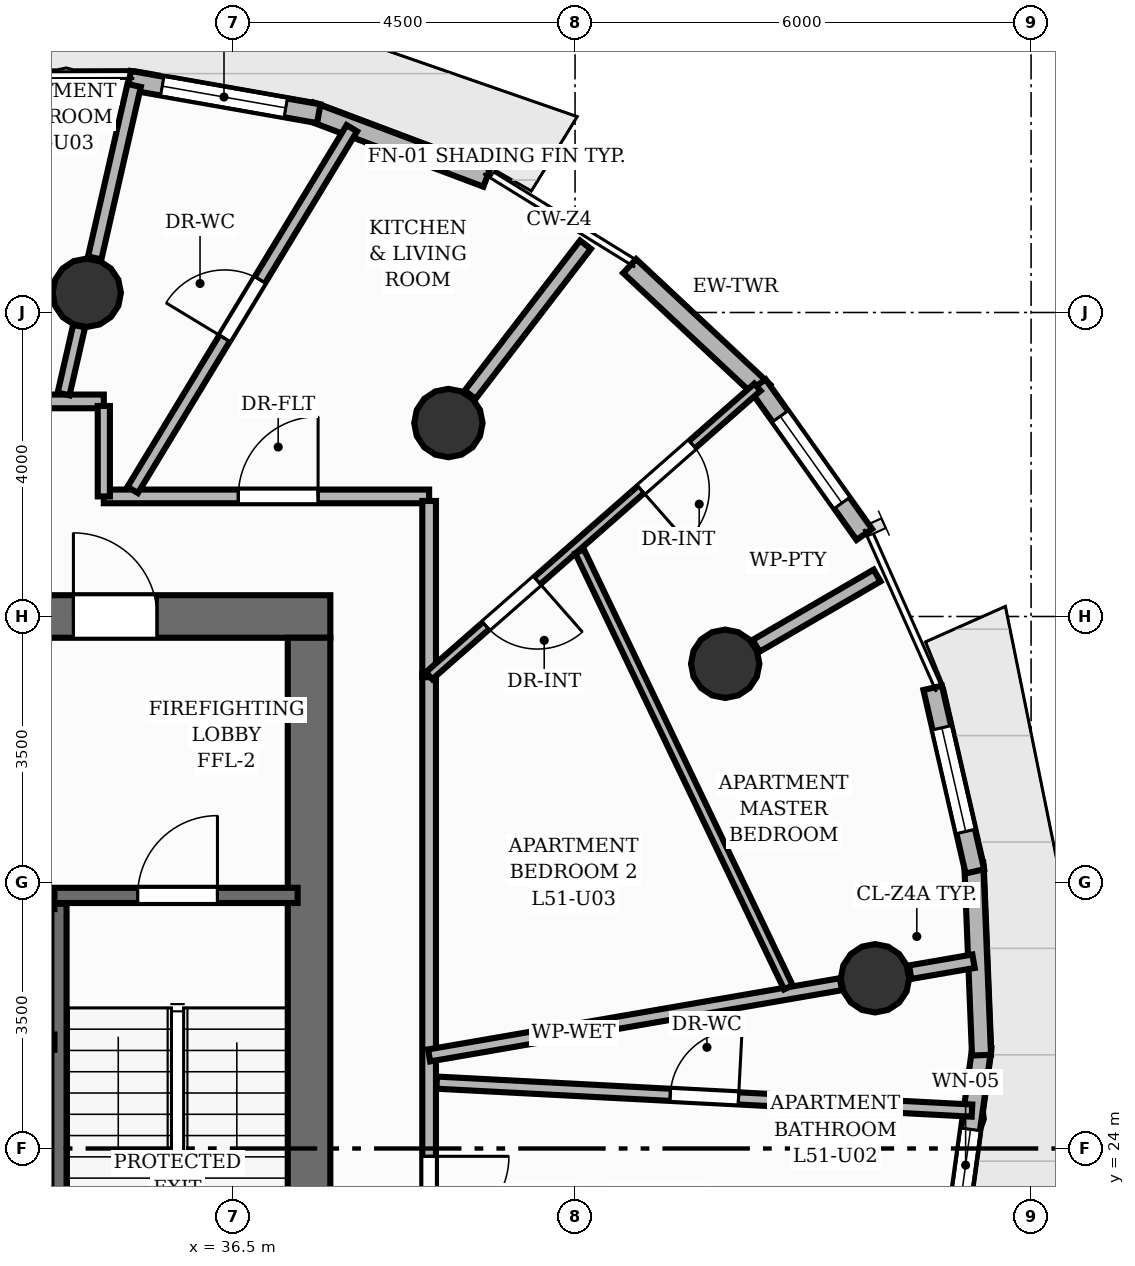
"""IFC4 building model, lengths in metres.
Left out: names, types, materials, properties, quantities, classifications, styles, units other than length and angle.
Written with IfcOpenShell. Run it as: python <this file> out.ifc"""

import sys

from ifc_helpers import new_model, si_unit, direction, frame, frame_2d, origin, origin_2d, place, context, subcontext, project, spatial, rectangle, circle, extrude, element, fill, save


model = new_model("IFC4")
c1 = context("Model", 3, precision=1e-05, world=origin(), true_north=direction((0.0, 1.0)))
c2 = subcontext(c1, "Body", "Model", "MODEL_VIEW")
j1 = project(units=[si_unit("LENGTHUNIT", "METRE"), si_unit("PLANEANGLEUNIT", "RADIAN")], contexts=[c1])
p1 = place(None, origin())
s1 = spatial("IfcSite", under=j1, at=p1, CompositionType="ELEMENT")
p2 = place(p1, origin())
s2 = spatial("IfcBuilding", under=s1, at=p2, CompositionType="ELEMENT")
p3 = place(p2, frame((0.0, 0.0, 172.64)))
s3 = spatial("IfcBuildingStorey", under=s2, at=p3, CompositionType="ELEMENT", Elevation=172.64)
p4 = place(p3, frame((26.22, 31.0, 0.0), z_axis=(0.0, 0.0, 1.0), x_axis=(1.0, 0.0, 0.0)))
e1 = element("IfcWall", 1, at=p4, inside=s3, PredefinedType="SHEAR", context=c2, shape_type="SweptSolid", body=[
    extrude(rectangle(XDim=11.56, YDim=0.56, at=frame_2d((5.78, 0.0))), origin(), (0.0, 0.0, 1.0), 3.2),
])
p5 = place(p4, frame((8.18, 0.0, 0.0)))
e2 = element("IfcOpeningElement", 2, at=p5, cuts=e1, PredefinedType="OPENING", context=c2, shape_type="SweptSolid", body=[
    extrude(rectangle(XDim=1.1, YDim=2.15, at=frame_2d((0.55, 1.075))), frame((0.0, 0.29, 0.0), z_axis=(0.0, -1.0, 0.0), x_axis=(1.0, 0.0, 0.0)), (0.0, 0.0, 1.0), 0.58),
])
p6 = place(p4, frame((0.805, 0.0, 0.0)))
e3 = element("IfcOpeningElement", 3, at=p6, cuts=e1, PredefinedType="OPENING", context=c2, shape_type="SweptSolid", body=[
    extrude(rectangle(XDim=1.05, YDim=2.15, at=frame_2d((0.525, 1.075))), frame((0.0, 0.29, 0.0), z_axis=(0.0, -1.0, 0.0), x_axis=(1.0, 0.0, 0.0)), (0.0, 0.0, 1.0), 0.58),
])
p7 = place(p4, frame((2.555, 0.0, 0.0)))
e4 = element("IfcOpeningElement", 4, at=p7, cuts=e1, PredefinedType="OPENING", context=c2, shape_type="SweptSolid", body=[
    extrude(rectangle(XDim=1.05, YDim=2.15, at=frame_2d((0.525, 1.075))), frame((0.0, 0.29, 0.0), z_axis=(0.0, -1.0, 0.0), x_axis=(1.0, 0.0, 0.0)), (0.0, 0.0, 1.0), 0.58),
])
p8 = place(p4, frame((4.305, 0.0, 0.0)))
e5 = element("IfcOpeningElement", 5, at=p8, cuts=e1, PredefinedType="OPENING", context=c2, shape_type="SweptSolid", body=[
    extrude(rectangle(XDim=1.05, YDim=2.15, at=frame_2d((0.525, 1.075))), frame((0.0, 0.29, 0.0), z_axis=(0.0, -1.0, 0.0), x_axis=(1.0, 0.0, 0.0)), (0.0, 0.0, 1.0), 0.58),
])
p9 = place(p3, frame((37.5, 17.28, 0.0), z_axis=(0.0, 0.0, 1.0), x_axis=(0.0, 1.0, 0.0)))
e6 = element("IfcWall", 6, at=p9, inside=s3, PredefinedType="SHEAR", context=c2, shape_type="SweptSolid", body=[
    extrude(rectangle(XDim=13.44, YDim=0.56, at=frame_2d((6.72, 0.0))), origin(), (0.0, 0.0, 1.0), 3.2),
])
for number, where, z_axis, x_axis in (
    (7, (44.946, 26.24, 0.0), (0.0, 0.0, 1.0), (1.0, 0.0, 0.0)),
    (8, (42.975, 30.378, 0.0), (0.0, 0.0, 1.0), (1.0, 0.0, 0.0)),
    (9, (39.333, 33.545, 0.0), (0.0, 0.0, 1.0), (1.0, 0.0, 0.0)),
    (10, (34.575, 35.26, 0.0), (0.0, 0.0, 1.0), (1.0, 0.0, 0.0)),
):
    element("IfcColumn", number, at=place(p3, frame(where, z_axis=z_axis, x_axis=x_axis)), inside=s3, PredefinedType="COLUMN", context=c2, shape_type="SweptSolid", body=[
        extrude(circle(Radius=0.45, at=origin_2d()), origin(), (0.0, 0.0, 1.0), 3.2),
    ])
p10 = place(p3, frame((41.718, 35.611, 0.0), z_axis=(0.0, 0.0, 1.0), x_axis=(0.730224222865, -0.683207570465, 0.0)))
e11 = element("IfcWall", 11, at=p10, inside=s3, PredefinedType="SOLIDWALL", context=c2, shape_type="SweptSolid", body=[
    extrude(rectangle(XDim=2.415, YDim=0.25, at=frame_2d((1.207, 0.0))), origin(), (0.0, 0.0, 1.0), 2.96),
])
p11 = place(p3, frame((37.519, 37.645, 0.0), z_axis=(0.0, 0.0, 1.0), x_axis=(0.93586674787, -0.352354126172, 0.0)))
e12 = element("IfcWall", 12, at=p11, inside=s3, PredefinedType="SOLIDWALL", context=c2, shape_type="SweptSolid", body=[
    extrude(rectangle(XDim=2.478, YDim=0.25, at=frame_2d((1.239, 0.0))), origin(), (0.0, 0.0, 1.0), 2.96),
])
p12 = place(p3, frame((35.135, 38.055, 0.0), z_axis=(0.0, 0.0, 1.0), x_axis=(0.984837873762, -0.173477267688, 0.0)))
e13 = element("IfcWall", 13, at=p12, inside=s3, PredefinedType="SOLIDWALL", context=c2, shape_type="SweptSolid", body=[
    extrude(rectangle(XDim=2.532, YDim=0.25, at=frame_2d((1.266, 0.0))), origin(), (0.0, 0.0, 1.0), 2.96),
])
p13 = place(p12, frame((0.441, 0.0, 0.85)))
e14 = element("IfcOpeningElement", 14, at=p13, cuts=e13, PredefinedType="OPENING", context=c2, shape_type="SweptSolid", body=[
    extrude(rectangle(XDim=1.65, YDim=1.55, at=frame_2d((0.825, 0.775))), frame((0.0, 0.135, 0.0), z_axis=(0.0, -1.0, 0.0), x_axis=(1.0, 0.0, 0.0)), (0.0, 0.0, 1.0), 0.27),
])
p14 = place(p3, frame((46.353, 25.34, 0.0), z_axis=(0.0, 0.0, 1.0), x_axis=(-0.136289981327, -0.990668986589, 0.0)))
e15 = element("IfcWall", 15, at=p14, inside=s3, PredefinedType="SOLIDWALL", context=c2, shape_type="SweptSolid", body=[
    extrude(rectangle(XDim=2.592, YDim=0.25, at=frame_2d((1.296, 0.0))), origin(), (0.0, 0.0, 1.0), 2.96),
])
p15 = place(p14, frame((1.098, 0.0, 0.85)))
e16 = element("IfcOpeningElement", 16, at=p15, cuts=e15, PredefinedType="OPENING", context=c2, shape_type="SweptSolid", body=[
    extrude(rectangle(XDim=0.95, YDim=1.45, at=frame_2d((0.475, 0.725))), frame((0.0, 0.135, 0.0), z_axis=(0.0, -1.0, 0.0), x_axis=(1.0, 0.0, 0.0)), (0.0, 0.0, 1.0), 0.27),
])
p16 = place(p3, frame((46.245, 27.758, 0.0), z_axis=(0.0, 0.0, 1.0), x_axis=(0.040399298921, -0.999183615081, 0.0)))
e17 = element("IfcWall", 17, at=p16, inside=s3, PredefinedType="SOLIDWALL", context=c2, shape_type="SweptSolid", body=[
    extrude(rectangle(XDim=2.532, YDim=0.25, at=frame_2d((1.266, 0.0))), origin(), (0.0, 0.0, 1.0), 2.96),
])
p17 = place(p3, frame((45.705, 30.061, 0.0), z_axis=(0.0, 0.0, 1.0), x_axis=(0.224175769227, -0.974548728639, 0.0)))
e18 = element("IfcWall", 18, at=p17, inside=s3, PredefinedType="SOLIDWALL", context=c2, shape_type="SweptSolid", body=[
    extrude(rectangle(XDim=2.478, YDim=0.25, at=frame_2d((1.239, 0.0))), origin(), (0.0, 0.0, 1.0), 2.96),
])
p18 = place(p17, frame((0.539, 0.0, 0.85)))
e19 = element("IfcOpeningElement", 19, at=p18, cuts=e18, PredefinedType="OPENING", context=c2, shape_type="SweptSolid", body=[
    extrude(rectangle(XDim=1.4, YDim=1.55, at=frame_2d((0.7, 0.775))), frame((0.0, 0.135, 0.0), z_axis=(0.0, -1.0, 0.0), x_axis=(1.0, 0.0, 0.0)), (0.0, 0.0, 1.0), 0.27),
])
p19 = place(p3, frame((43.406, 34.047, 0.0), z_axis=(0.0, 0.0, 1.0), x_axis=(0.579505880656, -0.814968057217, 0.0)))
e20 = element("IfcWall", 20, at=p19, inside=s3, PredefinedType="SOLIDWALL", context=c2, shape_type="SweptSolid", body=[
    extrude(rectangle(XDim=2.415, YDim=0.25, at=frame_2d((1.208, 0.0))), origin(), (0.0, 0.0, 1.0), 2.96),
])
p20 = place(p19, frame((0.507, 0.0, 0.85)))
e21 = element("IfcOpeningElement", 21, at=p20, cuts=e20, PredefinedType="OPENING", context=c2, shape_type="SweptSolid", body=[
    extrude(rectangle(XDim=1.4, YDim=1.55, at=frame_2d((0.7, 0.775))), frame((0.0, 0.135, 0.0), z_axis=(0.0, -1.0, 0.0), x_axis=(1.0, 0.0, 0.0)), (0.0, 0.0, 1.0), 0.27),
])
p21 = place(p3, frame((34.21, 20.78, 0.0), z_axis=(0.0, 0.0, 1.0), x_axis=(0.0, 1.0, 0.0)))
e22 = element("IfcWall", 22, at=p21, inside=s3, PredefinedType="SHEAR", context=c2, shape_type="SweptSolid", body=[
    extrude(rectangle(XDim=6.44, YDim=0.2, at=frame_2d((3.22, 0.0))), origin(), (0.0, 0.0, 1.0), 3.2),
])
p22 = place(p3, frame((34.11, 27.33, 0.0), z_axis=(0.0, 0.0, 1.0), x_axis=(1.0, 0.0, 0.0)))
e23 = element("IfcWall", 23, at=p22, inside=s3, PredefinedType="SHEAR", context=c2, shape_type="SweptSolid", body=[
    extrude(rectangle(XDim=3.24, YDim=0.2, at=frame_2d((1.62, 0.0))), origin(), (0.0, 0.0, 1.0), 3.2),
])
p23 = place(p22, frame((1.135, 0.0, 0.0)))
e24 = element("IfcOpeningElement", 24, at=p23, cuts=e23, PredefinedType="OPENING", context=c2, shape_type="SweptSolid", body=[
    extrude(rectangle(XDim=1.05, YDim=2.15, at=frame_2d((0.525, 1.075))), frame((0.0, 0.11, 0.0), z_axis=(0.0, -1.0, 0.0), x_axis=(1.0, 0.0, 0.0)), (0.0, 0.0, 1.0), 0.22),
])
p24 = place(p3, frame((31.85, 27.25, 0.0), z_axis=(0.0, 0.0, 1.0), x_axis=(1.0, 0.0, 0.0)))
e25 = element("IfcWall", 25, at=p24, inside=s3, PredefinedType="SHEAR", context=c2, shape_type="SweptSolid", body=[
    extrude(rectangle(XDim=2.3, YDim=0.2, at=frame_2d((1.15, 0.0))), origin(), (0.0, 0.0, 1.0), 3.2),
])
p25 = place(p24, frame((0.95, 0.0, 0.0)))
e26 = element("IfcOpeningElement", 26, at=p25, cuts=e25, PredefinedType="OPENING", context=c2, shape_type="SweptSolid", body=[
    extrude(rectangle(XDim=1.1, YDim=2.15, at=frame_2d((0.55, 1.075))), frame((0.0, 0.11, 0.0), z_axis=(0.0, -1.0, 0.0), x_axis=(1.0, 0.0, 0.0)), (0.0, 0.0, 1.0), 0.22),
])
p26 = place(p3, frame((31.85, 25.4, 0.0), z_axis=(0.0, 0.0, 1.0), x_axis=(1.0, 0.0, 0.0)))
e27 = element("IfcWall", 27, at=p26, inside=s3, PredefinedType="SHEAR", context=c2, shape_type="SweptSolid", body=[
    extrude(rectangle(XDim=2.3, YDim=0.2, at=frame_2d((1.15, 0.0))), origin(), (0.0, 0.0, 1.0), 3.2),
])
p27 = place(p3, frame((45.409, 26.32, 0.0), z_axis=(0.0, 0.0, 1.0), x_axis=(0.985336508055, 0.170622290144, 0.0)))
e28 = element("IfcWall", 28, at=p27, inside=s3, PredefinedType="PARTITIONING", context=c2, shape_type="SweptSolid", body=[
    extrude(rectangle(XDim=0.846, YDim=0.18, at=frame_2d((0.423, 0.0))), origin(), (0.0, 0.0, 1.0), 2.404),
])
p28 = place(p3, frame((43.382, 30.614, 0.0), z_axis=(0.0, 0.0, 1.0), x_axis=(0.864604991586, 0.502452195264, 0.0)))
e29 = element("IfcWall", 29, at=p28, inside=s3, PredefinedType="PARTITIONING", context=c2, shape_type="SweptSolid", body=[
    extrude(rectangle(XDim=1.841, YDim=0.18, at=frame_2d((0.92, 0.0))), origin(), (0.0, 0.0, 1.0), 2.404),
])
p29 = place(p3, frame((39.62, 33.918, 0.0), z_axis=(0.0, 0.0, 1.0), x_axis=(0.609279402228, 0.792955616678, 0.0)))
e30 = element("IfcWall", 30, at=p29, inside=s3, PredefinedType="PARTITIONING", context=c2, shape_type="SweptSolid", body=[
    extrude(rectangle(XDim=2.49, YDim=0.18, at=frame_2d((1.245, 0.0))), origin(), (0.0, 0.0, 1.0), 2.404),
])
p30 = place(p3, frame((34.68, 35.718, 0.0), z_axis=(0.0, 0.0, 1.0), x_axis=(0.222998449778, 0.974818799263, 0.0)))
e31 = element("IfcWall", 31, at=p30, inside=s3, PredefinedType="PARTITIONING", context=c2, shape_type="SweptSolid", body=[
    extrude(rectangle(XDim=2.329, YDim=0.18, at=frame_2d((1.164, 0.0))), origin(), (0.0, 0.0, 1.0), 2.404),
])
p31 = place(p3, frame((39.08, 30.248, 0.0), z_axis=(0.0, 0.0, 1.0), x_axis=(0.0, -1.0, 0.0)))
e32 = element("IfcWall", 32, at=p31, inside=s3, PredefinedType="PARTITIONING", context=c2, shape_type="SweptSolid", body=[
    extrude(rectangle(XDim=14.828, YDim=0.18, at=frame_2d((7.414, 0.0))), origin(), (0.0, 0.0, 1.0), 2.955),
])
p32 = place(p31, frame((6.351, 0.0, 0.0)))
e33 = element("IfcOpeningElement", 33, at=p32, cuts=e32, PredefinedType="OPENING", context=c2, shape_type="SweptSolid", body=[
    extrude(rectangle(XDim=1.05, YDim=2.15, at=frame_2d((0.525, 1.075))), frame((0.0, 0.1, 0.0), z_axis=(0.0, -1.0, 0.0), x_axis=(1.0, 0.0, 0.0)), (0.0, 0.0, 1.0), 0.2),
])
p33 = place(p3, frame((34.8, 32.58, 0.0), z_axis=(0.0, 0.0, 1.0), x_axis=(1.0, 0.0, 0.0)))
e34 = element("IfcWall", 34, at=p33, inside=s3, PredefinedType="PARTITIONING", context=c2, shape_type="SweptSolid", body=[
    extrude(rectangle(XDim=4.28, YDim=0.18, at=frame_2d((2.14, 0.0))), origin(), (0.0, 0.0, 1.0), 2.955),
])
p34 = place(p33, frame((1.769, 0.0, 0.0)))
e35 = element("IfcOpeningElement", 35, at=p34, cuts=e34, PredefinedType="OPENING", context=c2, shape_type="SweptSolid", body=[
    extrude(rectangle(XDim=1.05, YDim=2.15, at=frame_2d((0.525, 1.075))), frame((0.0, 0.1, 0.0), z_axis=(0.0, -1.0, 0.0), x_axis=(1.0, 0.0, 0.0)), (0.0, 0.0, 1.0), 0.2),
])
p35 = place(p3, frame((39.08, 32.52, 0.0), z_axis=(0.0, 0.0, 1.0), x_axis=(0.0, -1.0, 0.0)))
e36 = element("IfcWall", 36, at=p35, inside=s3, PredefinedType="PARTITIONING", context=c2, shape_type="SweptSolid", body=[
    extrude(rectangle(XDim=2.319, YDim=0.18, at=frame_2d((1.159, 0.0))), origin(), (0.0, 0.0, 1.0), 2.955),
])
p36 = place(p3, frame((29.2, 33.83, 0.0), z_axis=(0.0, 0.0, 1.0), x_axis=(1.0, 0.0, 0.0)))
e37 = element("IfcWall", 37, at=p36, inside=s3, PredefinedType="PARTITIONING", context=c2, shape_type="SweptSolid", body=[
    extrude(rectangle(XDim=5.6, YDim=0.18, at=frame_2d((2.8, 0.0))), origin(), (0.0, 0.0, 1.0), 2.955),
])
p37 = place(p3, frame((34.8, 33.77, 0.0), z_axis=(0.0, 0.0, 1.0), x_axis=(0.0, -1.0, 0.0)))
e38 = element("IfcWall", 38, at=p37, inside=s3, PredefinedType="PLUMBINGWALL", context=c2, shape_type="SweptSolid", body=[
    extrude(rectangle(XDim=1.19, YDim=0.16, at=frame_2d((0.595, 0.0))), origin(), (0.0, 0.0, 1.0), 2.955),
])
p38 = place(p3, frame((39.18, 24.867, 0.0), z_axis=(0.0, 0.0, 1.0), x_axis=(0.998636225788, -0.052208127179, 0.0)))
e39 = element("IfcWall", 39, at=p38, inside=s3, PredefinedType="PLUMBINGWALL", context=c2, shape_type="SweptSolid", body=[
    extrude(rectangle(XDim=7.052, YDim=0.16, at=frame_2d((3.526, 0.0))), origin(), (0.0, 0.0, 1.0), 2.692),
])
p39 = place(p38, frame((3.076, 0.0, 0.0)))
e40 = element("IfcOpeningElement", 40, at=p39, cuts=e39, PredefinedType="OPENING", context=c2, shape_type="SweptSolid", body=[
    extrude(rectangle(XDim=0.9, YDim=2.1, at=frame_2d((0.45, 1.05))), frame((0.0, 0.09, 0.0), z_axis=(0.0, -1.0, 0.0), x_axis=(1.0, 0.0, 0.0)), (0.0, 0.0, 1.0), 0.18),
])
p40 = place(p3, frame((39.08, 25.225, 0.0), z_axis=(0.0, 0.0, 1.0), x_axis=(0.985359973695, 0.170486721591, 0.0)))
e41 = element("IfcWall", 41, at=p40, inside=s3, PredefinedType="PLUMBINGWALL", context=c2, shape_type="SweptSolid", body=[
    extrude(rectangle(XDim=5.499, YDim=0.16, at=frame_2d((2.75, 0.0))), origin(), (0.0, 0.0, 1.0), 2.404),
])
p41 = place(p3, frame((35.18, 32.666, 0.0), z_axis=(0.0, 0.0, 1.0), x_axis=(0.518194743754, 0.855262654128, 0.0)))
e42 = element("IfcWall", 42, at=p41, inside=s3, PredefinedType="PLUMBINGWALL", context=c2, shape_type="SweptSolid", body=[
    extrude(rectangle(XDim=5.564, YDim=0.16, at=frame_2d((2.782, 0.0))), origin(), (0.0, 0.0, 1.0), 2.692),
])
p42 = place(p41, frame((2.332, 0.0, 0.0)))
e43 = element("IfcOpeningElement", 43, at=p42, cuts=e42, PredefinedType="OPENING", context=c2, shape_type="SweptSolid", body=[
    extrude(rectangle(XDim=0.9, YDim=2.1, at=frame_2d((0.45, 1.05))), frame((0.0, 0.09, 0.0), z_axis=(0.0, -1.0, 0.0), x_axis=(1.0, 0.0, 0.0)), (0.0, 0.0, 1.0), 0.18),
])
p43 = place(p3, frame((43.4, 34.017, 0.0), z_axis=(0.0, 0.0, 1.0), x_axis=(-0.751212741732, -0.660060161394, 0.0)))
e44 = element("IfcWall", 44, at=p43, inside=s3, PredefinedType="PARTITIONING", context=c2, shape_type="SweptSolid", body=[
    extrude(rectangle(XDim=5.75, YDim=0.125, at=frame_2d((2.875, 0.0))), origin(), (0.0, 0.0, 1.0), 2.955),
])
p44 = place(p43, frame((1.141, 0.0, 0.0)))
e45 = element("IfcOpeningElement", 45, at=p44, cuts=e44, PredefinedType="OPENING", context=c2, shape_type="SweptSolid", body=[
    extrude(rectangle(XDim=0.9, YDim=2.1, at=frame_2d((0.45, 1.05))), frame((0.0, 0.073, 0.0), z_axis=(0.0, -1.0, 0.0), x_axis=(1.0, 0.0, 0.0)), (0.0, 0.0, 1.0), 0.145),
])
p45 = place(p43, frame((3.856, 0.0, 0.0)))
e46 = element("IfcOpeningElement", 46, at=p45, cuts=e44, PredefinedType="OPENING", context=c2, shape_type="SweptSolid", body=[
    extrude(rectangle(XDim=0.9, YDim=2.1, at=frame_2d((0.45, 1.05))), frame((0.0, 0.073, 0.0), z_axis=(0.0, -1.0, 0.0), x_axis=(1.0, 0.0, 0.0)), (0.0, 0.0, 1.0), 0.145),
])
p46 = place(p3, frame((34.271, 33.927, 0.0), z_axis=(0.0, 0.0, 1.0), x_axis=(0.222991179816, 0.974820462303, 0.0)))
e47 = element("IfcWall", 47, at=p46, inside=s3, PredefinedType="PLUMBINGWALL", context=c2, shape_type="SweptSolid", body=[
    extrude(rectangle(XDim=0.917, YDim=0.16, at=frame_2d((0.458, 0.0))), origin(), (0.0, 0.0, 1.0), 2.404),
])
p47 = place(p3, frame((43.806, 26.121, 0.0), z_axis=(0.0, 0.0, 1.0), x_axis=(-0.431903618355, 0.901919766083, 0.0)))
e48 = element("IfcWall", 48, at=p47, inside=s3, PredefinedType="PARTITIONING", context=c2, shape_type="SweptSolid", body=[
    extrude(rectangle(XDim=6.361, YDim=0.125, at=frame_2d((3.18, 0.0))), origin(), (0.0, 0.0, 1.0), 2.488),
])
p48 = place(p13, origin())
e49 = element("IfcWindow", 49, at=p48, inside=s3, PartitioningType="SINGLE_PANEL", PredefinedType="WINDOW", context=c2, shape_type="SweptSolid", body=[
    extrude(rectangle(XDim=1.65, YDim=1.55, at=frame_2d((0.825, 0.775))), frame((0.0, 0.03, 0.0), z_axis=(0.0, -1.0, 0.0), x_axis=(1.0, 0.0, 0.0)), (0.0, 0.0, 1.0), 0.06),
])
fill(e14, e49)
p49 = place(p15, origin())
e50 = element("IfcWindow", 50, at=p49, inside=s3, PartitioningType="SINGLE_PANEL", PredefinedType="WINDOW", context=c2, shape_type="SweptSolid", body=[
    extrude(rectangle(XDim=0.95, YDim=1.45, at=frame_2d((0.475, 0.725))), frame((0.0, 0.03, 0.0), z_axis=(0.0, -1.0, 0.0), x_axis=(1.0, 0.0, 0.0)), (0.0, 0.0, 1.0), 0.06),
])
fill(e16, e50)
p50 = place(p18, origin())
e51 = element("IfcWindow", 51, at=p50, inside=s3, PartitioningType="SINGLE_PANEL", PredefinedType="WINDOW", context=c2, shape_type="SweptSolid", body=[
    extrude(rectangle(XDim=1.4, YDim=1.55, at=frame_2d((0.7, 0.775))), frame((0.0, 0.03, 0.0), z_axis=(0.0, -1.0, 0.0), x_axis=(1.0, 0.0, 0.0)), (0.0, 0.0, 1.0), 0.06),
])
fill(e19, e51)
p51 = place(p20, origin())
e52 = element("IfcWindow", 52, at=p51, inside=s3, PartitioningType="SINGLE_PANEL", PredefinedType="WINDOW", context=c2, shape_type="SweptSolid", body=[
    extrude(rectangle(XDim=1.4, YDim=1.55, at=frame_2d((0.7, 0.775))), frame((0.0, 0.03, 0.0), z_axis=(0.0, -1.0, 0.0), x_axis=(1.0, 0.0, 0.0)), (0.0, 0.0, 1.0), 0.06),
])
fill(e21, e52)
p52 = place(p23, origin())
e53 = element("IfcDoor", 53, at=p52, inside=s3, OperationType="SINGLE_SWING_RIGHT", PredefinedType="DOOR", context=c2, shape_type="SweptSolid", body=[
    extrude(rectangle(XDim=1.05, YDim=2.15, at=frame_2d((0.525, 1.075))), frame((0.0, 0.025, 0.0), z_axis=(0.0, -1.0, 0.0), x_axis=(1.0, 0.0, 0.0)), (0.0, 0.0, 1.0), 0.05),
])
fill(e24, e53)
p53 = place(p5, origin())
e54 = element("IfcDoor", 54, at=p53, inside=s3, OperationType="SINGLE_SWING_LEFT", PredefinedType="DOOR", context=c2, shape_type="SweptSolid", body=[
    extrude(rectangle(XDim=1.1, YDim=2.15, at=frame_2d((0.55, 1.075))), frame((0.0, 0.025, 0.0), z_axis=(0.0, -1.0, 0.0), x_axis=(1.0, 0.0, 0.0)), (0.0, 0.0, 1.0), 0.05),
])
fill(e2, e54)
p54 = place(p32, origin())
e55 = element("IfcDoor", 55, at=p54, inside=s3, OperationType="SINGLE_SWING_LEFT", PredefinedType="DOOR", context=c2, shape_type="SweptSolid", body=[
    extrude(rectangle(XDim=1.05, YDim=2.15, at=frame_2d((0.525, 1.075))), frame((0.0, 0.025, 0.0), z_axis=(0.0, -1.0, 0.0), x_axis=(1.0, 0.0, 0.0)), (0.0, 0.0, 1.0), 0.05),
])
fill(e33, e55)
p55 = place(p39, origin())
e56 = element("IfcDoor", 56, at=p55, inside=s3, OperationType="SINGLE_SWING_RIGHT", PredefinedType="DOOR", context=c2, shape_type="SweptSolid", body=[
    extrude(rectangle(XDim=0.9, YDim=2.1, at=frame_2d((0.45, 1.05))), frame((0.0, 0.025, 0.0), z_axis=(0.0, -1.0, 0.0), x_axis=(1.0, 0.0, 0.0)), (0.0, 0.0, 1.0), 0.05),
])
fill(e40, e56)
p56 = place(p34, origin())
e57 = element("IfcDoor", 57, at=p56, inside=s3, OperationType="SINGLE_SWING_RIGHT", PredefinedType="DOOR", context=c2, shape_type="SweptSolid", body=[
    extrude(rectangle(XDim=1.05, YDim=2.15, at=frame_2d((0.525, 1.075))), frame((0.0, 0.025, 0.0), z_axis=(0.0, -1.0, 0.0), x_axis=(1.0, 0.0, 0.0)), (0.0, 0.0, 1.0), 0.05),
])
fill(e35, e57)
p57 = place(p42, origin())
e58 = element("IfcDoor", 58, at=p57, inside=s3, OperationType="SINGLE_SWING_LEFT", PredefinedType="DOOR", context=c2, shape_type="SweptSolid", body=[
    extrude(rectangle(XDim=0.9, YDim=2.1, at=frame_2d((0.45, 1.05))), frame((0.0, 0.025, 0.0), z_axis=(0.0, -1.0, 0.0), x_axis=(1.0, 0.0, 0.0)), (0.0, 0.0, 1.0), 0.05),
])
fill(e43, e58)
p58 = place(p44, origin())
e59 = element("IfcDoor", 59, at=p58, inside=s3, OperationType="SINGLE_SWING_RIGHT", PredefinedType="DOOR", context=c2, shape_type="SweptSolid", body=[
    extrude(rectangle(XDim=0.9, YDim=2.1, at=frame_2d((0.45, 1.05))), frame((0.0, 0.025, 0.0), z_axis=(0.0, -1.0, 0.0), x_axis=(1.0, 0.0, 0.0)), (0.0, 0.0, 1.0), 0.05),
])
fill(e45, e59)
p59 = place(p45, origin())
e60 = element("IfcDoor", 60, at=p59, inside=s3, OperationType="SINGLE_SWING_LEFT", PredefinedType="DOOR", context=c2, shape_type="SweptSolid", body=[
    extrude(rectangle(XDim=0.9, YDim=2.1, at=frame_2d((0.45, 1.05))), frame((0.0, 0.025, 0.0), z_axis=(0.0, -1.0, 0.0), x_axis=(1.0, 0.0, 0.0)), (0.0, 0.0, 1.0), 0.05),
])
fill(e46, e60)
save(model, sys.argv[1])
